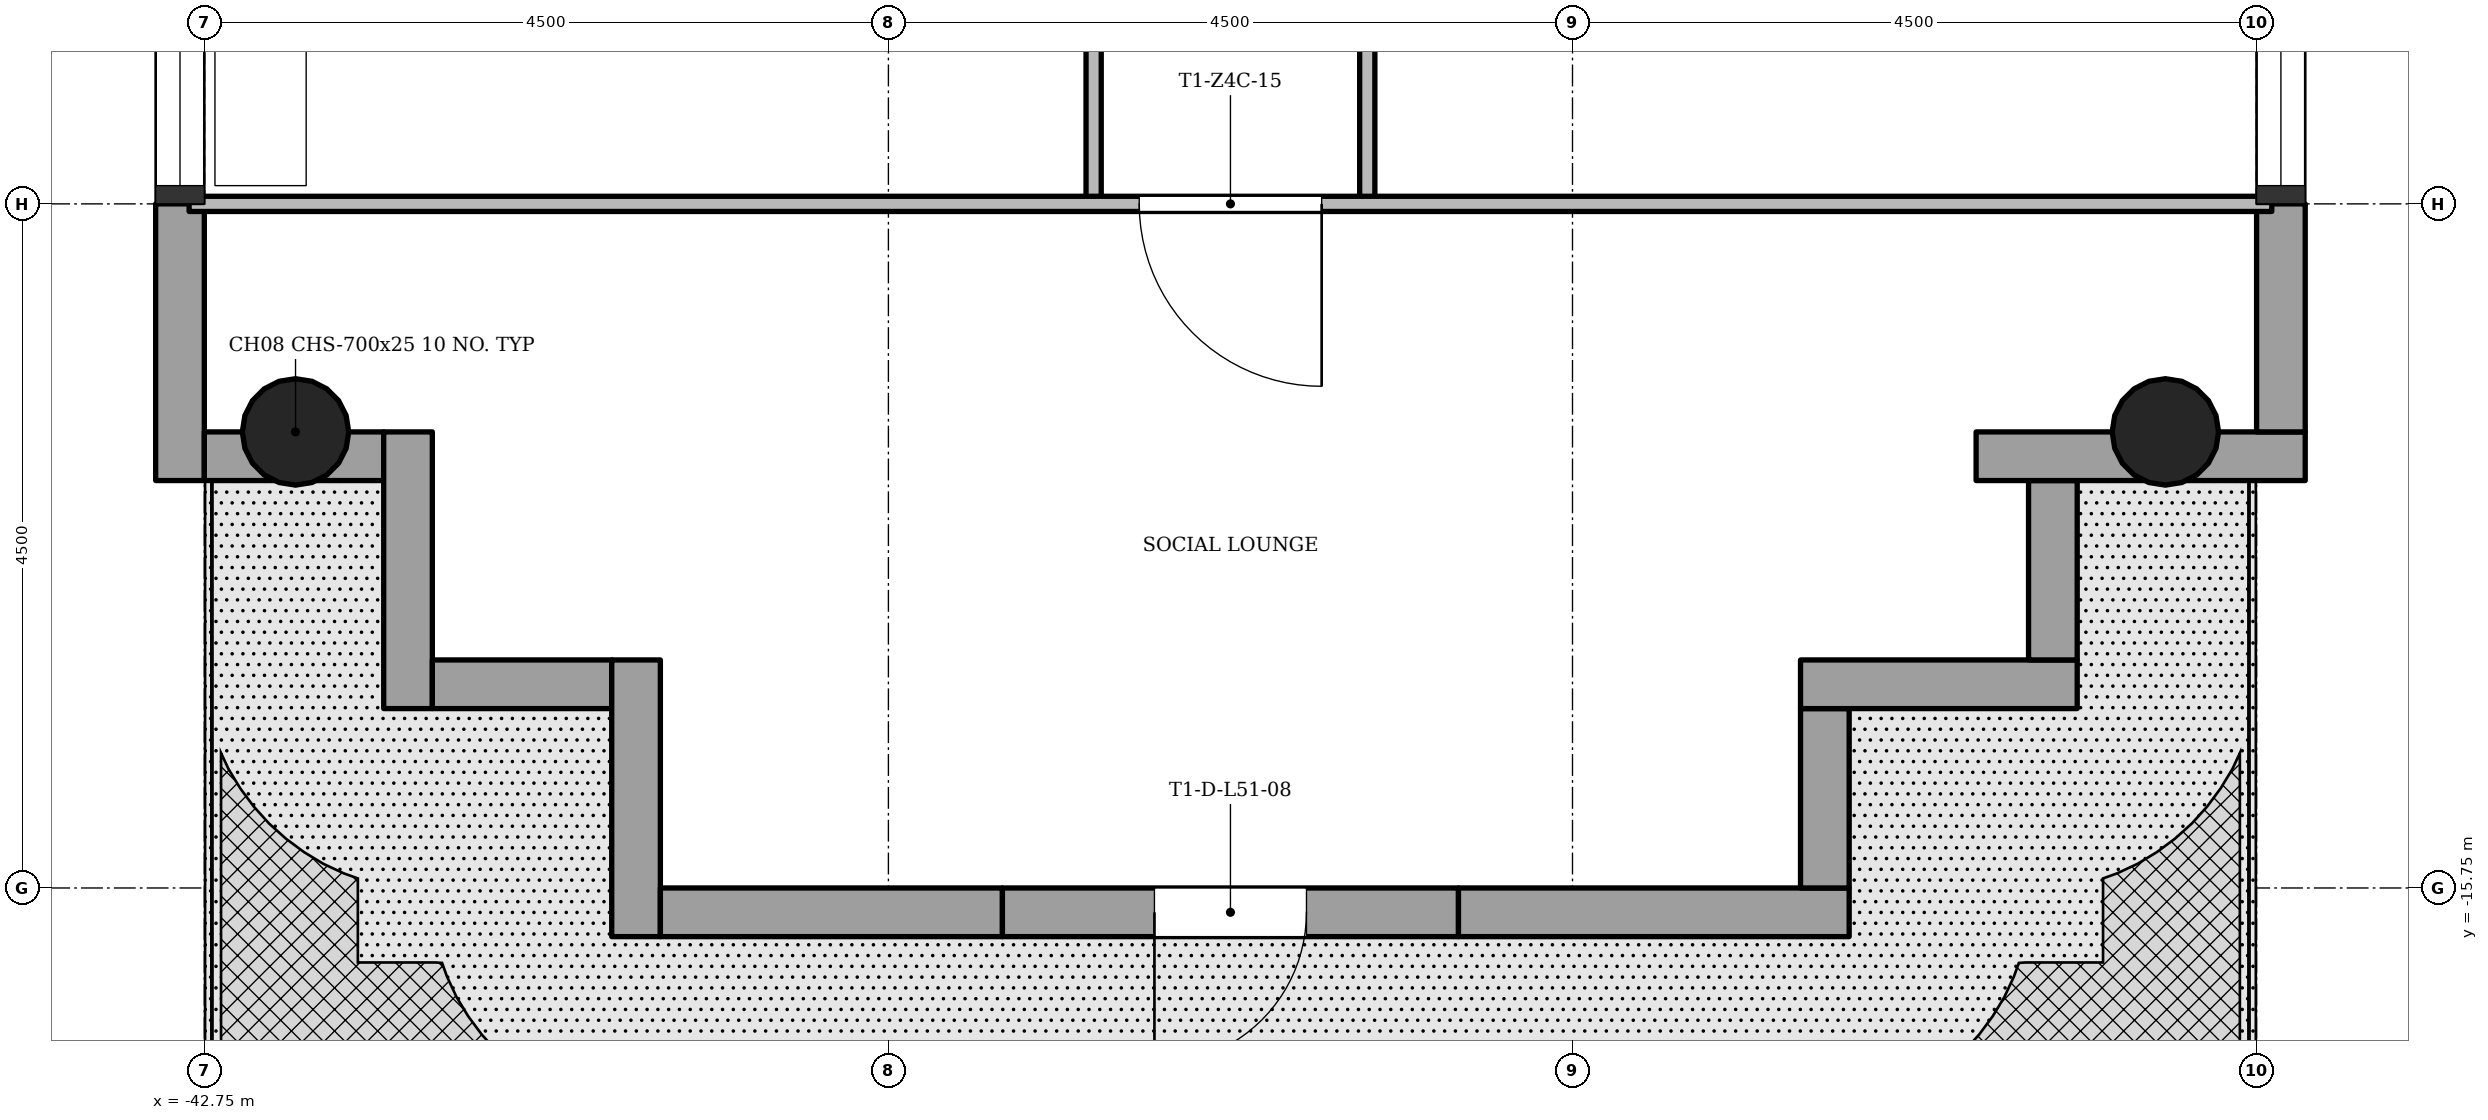
"""IFC4 building model, lengths in metres.
Left out: names, types, materials, properties, quantities, classifications, styles, units other than length and angle.
Written with IfcOpenShell. Run it as: python <this file> out.ifc"""

import sys

from ifc_helpers import new_model, si_unit, direction, frame, frame_2d, origin, origin_2d, place, context, subcontext, project, spatial, rectangle, hollow_circle, extrude, element, fill, save


model = new_model("IFC4")
c1 = context("Model", 3, precision=1e-05, world=origin(), true_north=direction((0.0, 1.0)))
c2 = subcontext(c1, "Body", "Model", "MODEL_VIEW")
j1 = project(units=[si_unit("LENGTHUNIT", "METRE"), si_unit("PLANEANGLEUNIT", "RADIAN")], contexts=[c1])
p1 = place(None, origin())
s1 = spatial("IfcSite", under=j1, at=p1, CompositionType="ELEMENT")
p2 = place(p1, origin())
s2 = spatial("IfcBuilding", under=s1, at=p2, CompositionType="ELEMENT")
p3 = place(p2, frame((0.0, 0.0, 185.8)))
s3 = spatial("IfcBuildingStorey", under=s2, at=p3, CompositionType="ELEMENT", Elevation=185.8)
for number, where, z_axis, x_axis in (
    (1, (-42.15, -12.75, 0.0), (0.0, 0.0, 1.0), (1.0, 0.0, 0.0)),
    (2, (-29.85, -12.75, 0.0), (0.0, 0.0, 1.0), (1.0, 0.0, 0.0)),
):
    element("IfcColumn", number, at=place(p3, frame(where, z_axis=z_axis, x_axis=x_axis)), inside=s3, PredefinedType="COLUMN", context=c2, shape_type="SweptSolid", body=[
        extrude(hollow_circle(Radius=0.35, WallThickness=0.025, at=origin_2d()), origin(), (0.0, 0.0, 1.0), 3.4),
    ])
p4 = place(p3, frame((-42.91, -11.25, 0.0), z_axis=(0.0, 0.0, 1.0), x_axis=(0.0, -1.0, 0.0)))
e3 = element("IfcWall", 3, at=p4, inside=s3, PredefinedType="STANDARD", context=c2, shape_type="SweptSolid", body=[
    extrude(rectangle(XDim=1.82, YDim=0.32, at=frame_2d((0.91, 0.0))), origin(), (0.0, 0.0, 1.0), 3.1),
])
p5 = place(p3, frame((-42.75, -12.91, -0.02), z_axis=(0.0, 0.0, 1.0), x_axis=(1.0, 0.0, 0.0)))
e4 = element("IfcWall", 4, at=p5, inside=s3, PredefinedType="STANDARD", context=c2, shape_type="SweptSolid", body=[
    extrude(rectangle(XDim=1.18, YDim=0.32, at=frame_2d((0.59, 0.0))), origin(), (0.0, 0.0, 1.0), 3.12),
])
p6 = place(p3, frame((-41.41, -12.75, -0.02), z_axis=(0.0, 0.0, 1.0), x_axis=(0.0, -1.0, 0.0)))
e5 = element("IfcWall", 5, at=p6, inside=s3, PredefinedType="STANDARD", context=c2, shape_type="SweptSolid", body=[
    extrude(rectangle(XDim=1.82, YDim=0.32, at=frame_2d((0.91, 0.0))), origin(), (0.0, 0.0, 1.0), 3.12),
])
p7 = place(p3, frame((-41.25, -14.41, -0.02), z_axis=(0.0, 0.0, 1.0), x_axis=(1.0, 0.0, 0.0)))
e6 = element("IfcWall", 6, at=p7, inside=s3, PredefinedType="STANDARD", context=c2, shape_type="SweptSolid", body=[
    extrude(rectangle(XDim=1.18, YDim=0.32, at=frame_2d((0.59, 0.0))), origin(), (0.0, 0.0, 1.0), 3.12),
])
p8 = place(p3, frame((-39.91, -14.25, -0.02), z_axis=(0.0, 0.0, 1.0), x_axis=(0.0, -1.0, 0.0)))
e7 = element("IfcWall", 7, at=p8, inside=s3, PredefinedType="STANDARD", context=c2, shape_type="SweptSolid", body=[
    extrude(rectangle(XDim=1.82, YDim=0.32, at=frame_2d((0.91, 0.0))), origin(), (0.0, 0.0, 1.0), 3.12),
])
p9 = place(p3, frame((-39.75, -15.91, -0.02), z_axis=(0.0, 0.0, 1.0), x_axis=(1.0, 0.0, 0.0)))
e8 = element("IfcWall", 8, at=p9, inside=s3, PredefinedType="STANDARD", context=c2, shape_type="SweptSolid", body=[
    extrude(rectangle(XDim=2.25, YDim=0.32, at=frame_2d((1.125, 0.0))), origin(), (0.0, 0.0, 1.0), 3.12),
])
p10 = place(p3, frame((-37.5, -15.91, -0.02), z_axis=(0.0, 0.0, 1.0), x_axis=(1.0, 0.0, 0.0)))
e9 = element("IfcWall", 9, at=p10, inside=s3, PredefinedType="STANDARD", context=c2, shape_type="SweptSolid", body=[
    extrude(rectangle(XDim=3.0, YDim=0.32, at=frame_2d((1.5, 0.0))), origin(), (0.0, 0.0, 1.0), 3.12),
])
p11 = place(p10, frame((1.0, 0.0, 0.02)))
e10 = element("IfcOpeningElement", 10, at=p11, cuts=e9, PredefinedType="OPENING", context=c2, shape_type="SweptSolid", body=[
    extrude(rectangle(XDim=1.0, YDim=2.1, at=frame_2d((0.5, 1.05))), frame((0.0, 0.17, 0.0), z_axis=(0.0, -1.0, 0.0), x_axis=(1.0, 0.0, 0.0)), (0.0, 0.0, 1.0), 0.34),
])
p12 = place(p3, frame((-34.5, -15.91, -0.02), z_axis=(0.0, 0.0, 1.0), x_axis=(1.0, 0.0, 0.0)))
e11 = element("IfcWall", 11, at=p12, inside=s3, PredefinedType="STANDARD", context=c2, shape_type="SweptSolid", body=[
    extrude(rectangle(XDim=2.57, YDim=0.32, at=frame_2d((1.285, 0.0))), origin(), (0.0, 0.0, 1.0), 3.12),
])
p13 = place(p3, frame((-32.09, -15.75, -0.02), z_axis=(0.0, 0.0, 1.0), x_axis=(0.0, 1.0, 0.0)))
e12 = element("IfcWall", 12, at=p13, inside=s3, PredefinedType="STANDARD", context=c2, shape_type="SweptSolid", body=[
    extrude(rectangle(XDim=1.18, YDim=0.32, at=frame_2d((0.59, 0.0))), origin(), (0.0, 0.0, 1.0), 3.12),
])
p14 = place(p3, frame((-32.25, -14.41, -0.02), z_axis=(0.0, 0.0, 1.0), x_axis=(1.0, 0.0, 0.0)))
e13 = element("IfcWall", 13, at=p14, inside=s3, PredefinedType="STANDARD", context=c2, shape_type="SweptSolid", body=[
    extrude(rectangle(XDim=1.82, YDim=0.32, at=frame_2d((0.91, 0.0))), origin(), (0.0, 0.0, 1.0), 3.12),
])
p15 = place(p3, frame((-30.59, -14.25, -0.02), z_axis=(0.0, 0.0, 1.0), x_axis=(0.0, 1.0, 0.0)))
e14 = element("IfcWall", 14, at=p15, inside=s3, PredefinedType="STANDARD", context=c2, shape_type="SweptSolid", body=[
    extrude(rectangle(XDim=1.18, YDim=0.32, at=frame_2d((0.59, 0.0))), origin(), (0.0, 0.0, 1.0), 3.12),
])
p16 = place(p3, frame((-31.095, -12.91, -0.02), z_axis=(0.0, 0.0, 1.0), x_axis=(1.0, 0.0, 0.0)))
e15 = element("IfcWall", 15, at=p16, inside=s3, PredefinedType="STANDARD", context=c2, shape_type="SweptSolid", body=[
    extrude(rectangle(XDim=2.165, YDim=0.32, at=frame_2d((1.083, 0.0))), origin(), (0.0, 0.0, 1.0), 3.12),
])
p17 = place(p3, frame((-29.09, -12.75, 0.0), z_axis=(0.0, 0.0, 1.0), x_axis=(0.0, 1.0, 0.0)))
e16 = element("IfcWall", 16, at=p17, inside=s3, PredefinedType="STANDARD", context=c2, shape_type="SweptSolid", body=[
    extrude(rectangle(XDim=1.5, YDim=0.32, at=frame_2d((0.75, 0.0))), origin(), (0.0, 0.0, 1.0), 3.1),
])
p18 = place(p3, frame((-36.9, -11.25, 0.0), z_axis=(0.0, 0.0, 1.0), x_axis=(0.0, 1.0, 0.0)))
e17 = element("IfcWall", 17, at=p18, inside=s3, PredefinedType="PARTITIONING", context=c2, shape_type="SweptSolid", body=[
    extrude(rectangle(XDim=6.75, YDim=0.1, at=frame_2d((3.375, 0.0))), origin(), (0.0, 0.0, 1.0), 3.0),
])
p19 = place(p18, frame((1.8, 0.0, 0.0)))
e18 = element("IfcOpeningElement", 18, at=p19, cuts=e17, PredefinedType="OPENING", context=c2, shape_type="SweptSolid", body=[
    extrude(rectangle(XDim=0.9, YDim=2.1, at=frame_2d((0.45, 1.05))), frame((0.0, 0.06, 0.0), z_axis=(0.0, -1.0, 0.0), x_axis=(1.0, 0.0, 0.0)), (0.0, 0.0, 1.0), 0.12),
])
p20 = place(p3, frame((-35.1, -11.25, 0.0), z_axis=(0.0, 0.0, 1.0), x_axis=(0.0, 1.0, 0.0)))
e19 = element("IfcWall", 19, at=p20, inside=s3, PredefinedType="PARTITIONING", context=c2, shape_type="SweptSolid", body=[
    extrude(rectangle(XDim=6.75, YDim=0.1, at=frame_2d((3.375, 0.0))), origin(), (0.0, 0.0, 1.0), 3.0),
])
p21 = place(p20, frame((1.8, 0.0, 0.0)))
e20 = element("IfcOpeningElement", 20, at=p21, cuts=e19, PredefinedType="OPENING", context=c2, shape_type="SweptSolid", body=[
    extrude(rectangle(XDim=0.9, YDim=2.1, at=frame_2d((0.45, 1.05))), frame((0.0, 0.06, 0.0), z_axis=(0.0, -1.0, 0.0), x_axis=(1.0, 0.0, 0.0)), (0.0, 0.0, 1.0), 0.12),
])
p22 = place(p3, frame((-42.85, -11.25, 0.0), z_axis=(0.0, 0.0, 1.0), x_axis=(1.0, 0.0, 0.0)))
e21 = element("IfcWall", 21, at=p22, inside=s3, PredefinedType="PARTITIONING", context=c2, shape_type="SweptSolid", body=[
    extrude(rectangle(XDim=13.7, YDim=0.1, at=frame_2d((6.85, 0.0))), origin(), (0.0, 0.0, 1.0), 3.0),
])
p23 = place(p22, frame((6.25, 0.0, 0.0)))
e22 = element("IfcOpeningElement", 22, at=p23, cuts=e21, PredefinedType="OPENING", context=c2, shape_type="SweptSolid", body=[
    extrude(rectangle(XDim=1.2, YDim=2.1, at=frame_2d((0.6, 1.05))), frame((0.0, 0.06, 0.0), z_axis=(0.0, -1.0, 0.0), x_axis=(1.0, 0.0, 0.0)), (0.0, 0.0, 1.0), 0.12),
])
p24 = place(p11, origin())
e23 = element("IfcDoor", 23, at=p24, inside=s3, OperationType="SINGLE_SWING_LEFT", PredefinedType="DOOR", context=c2, shape_type="SweptSolid", body=[
    extrude(rectangle(XDim=1.0, YDim=2.1, at=frame_2d((0.5, 1.05))), frame((0.0, 0.025, 0.0), z_axis=(0.0, -1.0, 0.0), x_axis=(1.0, 0.0, 0.0)), (0.0, 0.0, 1.0), 0.05),
])
fill(e10, e23)
p25 = place(p23, origin())
e24 = element("IfcDoor", 24, at=p25, inside=s3, OperationType="SINGLE_SWING_RIGHT", PredefinedType="DOOR", context=c2, shape_type="SweptSolid", body=[
    extrude(rectangle(XDim=1.2, YDim=2.1, at=frame_2d((0.6, 1.05))), frame((0.0, 0.025, 0.0), z_axis=(0.0, -1.0, 0.0), x_axis=(1.0, 0.0, 0.0)), (0.0, 0.0, 1.0), 0.05),
])
fill(e22, e24)
save(model, sys.argv[1])
